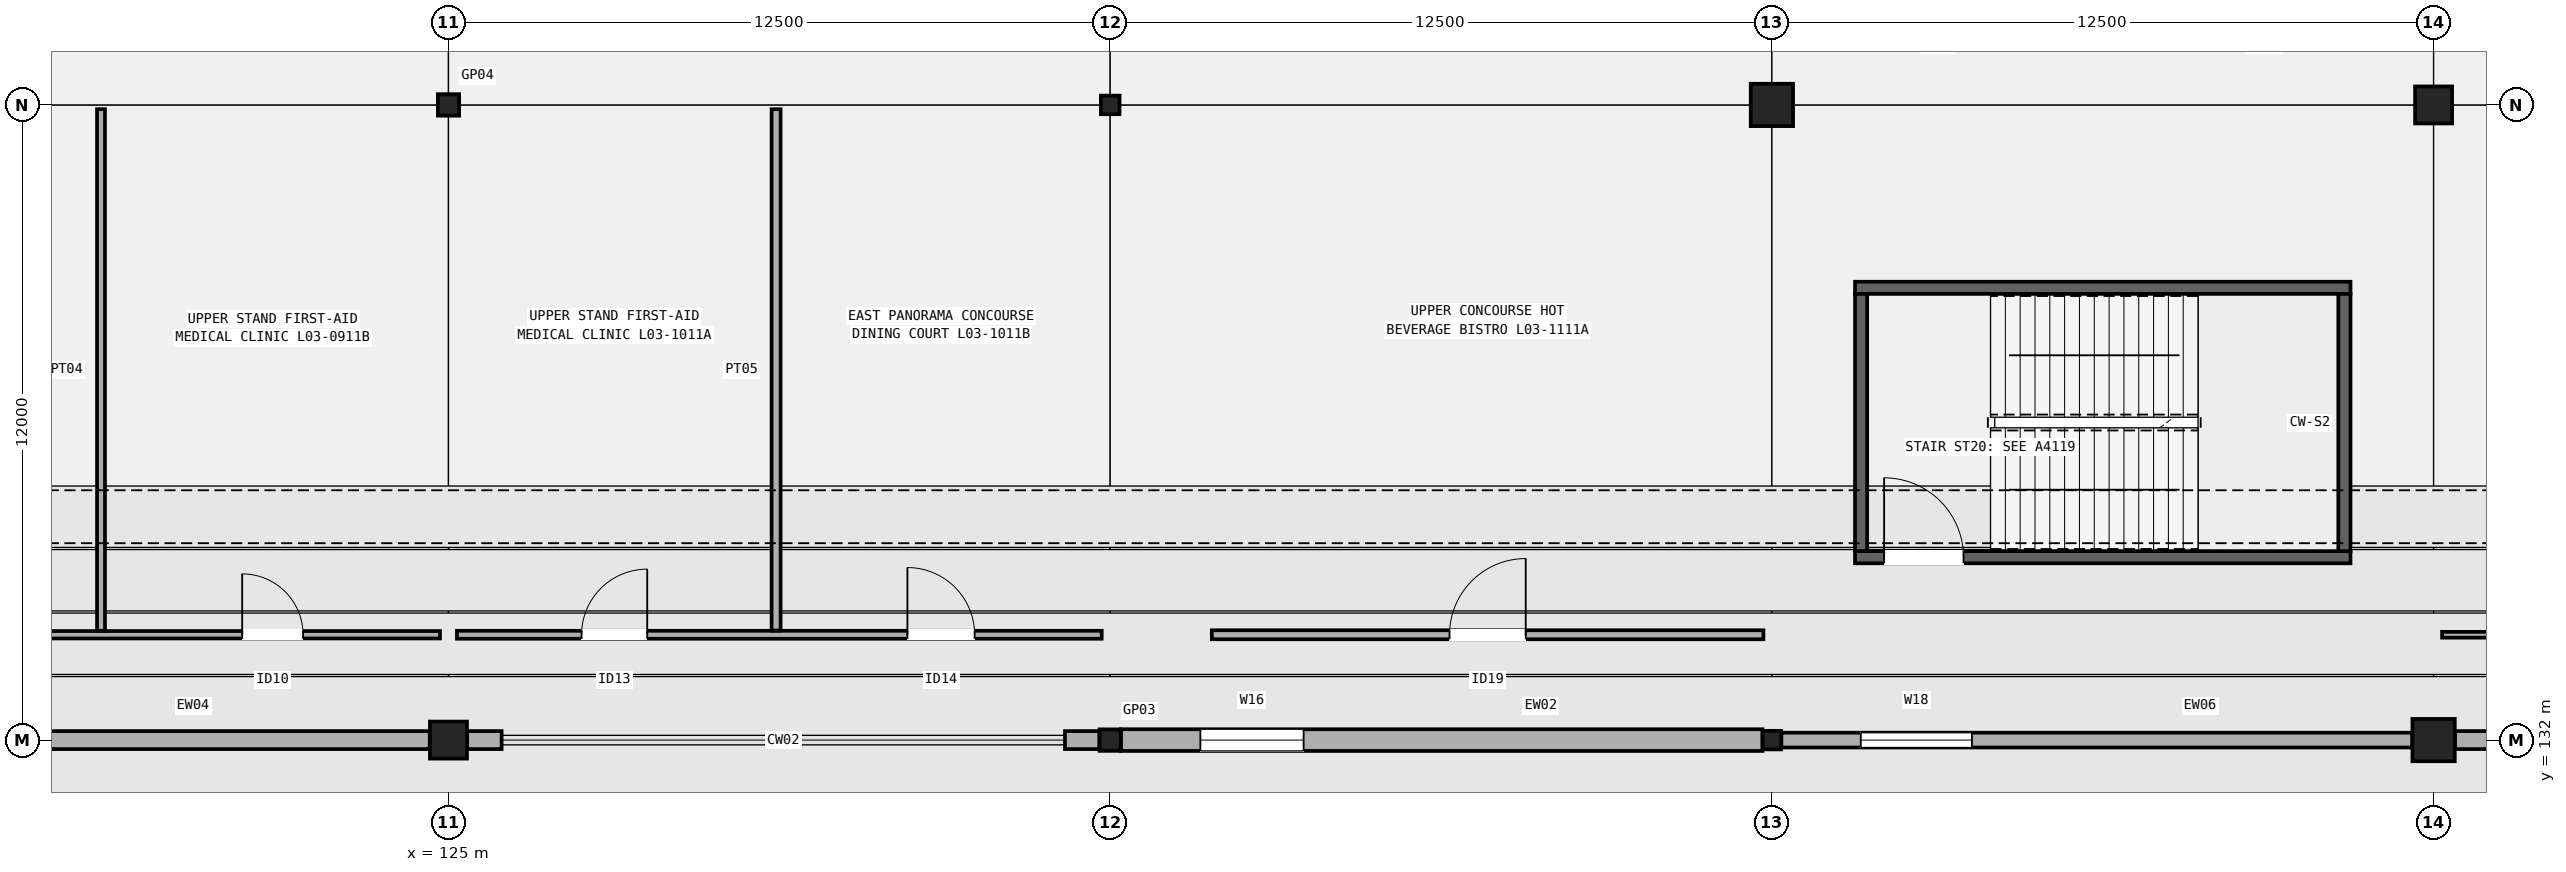
"""IFC4 building model, lengths in metres.
Left out: names, types, materials, properties, quantities, classifications, styles, units other than length and angle.
Written with IfcOpenShell. Run it as: python <this file> out.ifc"""

import sys

from ifc_helpers import new_model, si_unit, direction, frame, frame_2d, origin, origin_2d, place, context, subcontext, project, spatial, rectangle, hollow_rectangle, extrude, element, fill, save


model = new_model("IFC4")
c1 = context("Model", 3, precision=1e-05, world=origin(), true_north=direction((0.0, 1.0)))
c2 = subcontext(c1, "Body", "Model", "MODEL_VIEW")
j1 = project(units=[si_unit("LENGTHUNIT", "METRE"), si_unit("PLANEANGLEUNIT", "RADIAN")], contexts=[c1])
p1 = place(None, origin())
s1 = spatial("IfcSite", under=j1, at=p1, CompositionType="ELEMENT")
p2 = place(p1, origin())
s2 = spatial("IfcBuilding", under=s1, at=p2, CompositionType="ELEMENT")
p3 = place(p2, frame((0.0, 0.0, 15.3)))
s3 = spatial("IfcBuildingStorey", under=s2, at=p3, CompositionType="ELEMENT", Elevation=15.3)
p4 = place(p3, frame((125.0, 132.0, 0.0), z_axis=(0.0, 0.0, 1.0), x_axis=(1.0, 0.0, 0.0)))
e1 = element("IfcColumn", 1, at=p4, inside=s3, PredefinedType="COLUMN", context=c2, shape_type="SweptSolid", body=[
    extrude(rectangle(XDim=0.7, YDim=0.7, at=origin_2d()), origin(), (0.0, 0.0, 1.0), 5.1),
])
for number, where, z_axis, x_axis in (
    (2, (125.0, 144.0, 0.0), (0.0, 0.0, 1.0), (1.0, 0.0, 0.0)),
    (3, (137.5, 132.0, 0.0), (0.0, 0.0, 1.0), (1.0, 0.0, 0.0)),
):
    element("IfcColumn", number, at=place(p3, frame(where, z_axis=z_axis, x_axis=x_axis)), inside=s3, PredefinedType="COLUMN", context=c2, shape_type="SweptSolid", body=[
        extrude(hollow_rectangle(XDim=0.4, YDim=0.4, WallThickness=0.016, InnerFilletRadius=0.016, OuterFilletRadius=0.032, at=origin_2d()), origin(), (0.0, 0.0, 1.0), 5.1),
    ])
for number, where, z_axis, x_axis in (
    (4, (137.5, 144.0, 0.0), (0.0, 0.0, 1.0), (1.0, 0.0, 0.0)),
    (5, (150.0, 132.0, 0.0), (0.0, 0.0, 1.0), (1.0, 0.0, 0.0)),
):
    element("IfcColumn", number, at=place(p3, frame(where, z_axis=z_axis, x_axis=x_axis)), inside=s3, PredefinedType="COLUMN", context=c2, shape_type="SweptSolid", body=[
        extrude(hollow_rectangle(XDim=0.35, YDim=0.35, WallThickness=0.016, InnerFilletRadius=0.016, OuterFilletRadius=0.032, at=origin_2d()), origin(), (0.0, 0.0, 1.0), 5.1),
    ])
for number, where, z_axis, x_axis in (
    (6, (150.0, 144.0, 0.0), (0.0, 0.0, 1.0), (1.0, 0.0, 0.0)),
    (7, (162.5, 132.0, 0.0), (0.0, 0.0, 1.0), (1.0, 0.0, 0.0)),
):
    element("IfcColumn", number, at=place(p3, frame(where, z_axis=z_axis, x_axis=x_axis)), inside=s3, PredefinedType="COLUMN", context=c2, shape_type="SweptSolid", body=[
        extrude(rectangle(XDim=0.8, YDim=0.8, at=origin_2d()), origin(), (0.0, 0.0, 1.0), 5.1),
    ])
p5 = place(p3, frame((162.5, 144.0, 0.0), z_axis=(0.0, 0.0, 1.0), x_axis=(1.0, 0.0, 0.0)))
e8 = element("IfcColumn", 8, at=p5, inside=s3, PredefinedType="COLUMN", context=c2, shape_type="SweptSolid", body=[
    extrude(rectangle(XDim=0.7, YDim=0.7, at=origin_2d()), origin(), (0.0, 0.0, 1.0), 5.1),
])
p6 = place(p3, frame((112.404, 132.0, 0.0), z_axis=(0.0, 0.0, 1.0), x_axis=(1.0, 0.0, 0.0)))
e9 = element("IfcWall", 9, at=p6, inside=s3, PredefinedType="SOLIDWALL", context=c2, shape_type="SweptSolid", body=[
    extrude(rectangle(XDim=12.242, YDim=0.34, at=frame_2d((6.121, 0.0))), origin(), (0.0, 0.0, 1.0), 4.172),
])
p7 = place(p6, frame((1.5, 0.0, 0.95)))
e10 = element("IfcOpeningElement", 10, at=p7, cuts=e9, PredefinedType="OPENING", context=c2, shape_type="SweptSolid", body=[
    extrude(rectangle(XDim=1.5, YDim=2.25, at=frame_2d((0.75, 1.125))), frame((0.0, 0.18, 0.0), z_axis=(0.0, -1.0, 0.0), x_axis=(1.0, 0.0, 0.0)), (0.0, 0.0, 1.0), 0.36),
])
for number, where, z_axis, x_axis in (
    (11, (125.354, 132.0, 0.0), (0.0, 0.0, 1.0), (1.0, 0.0, 0.0)),
    (12, (136.646, 132.0, 0.0), (0.0, 0.0, 1.0), (1.0, 0.0, 0.0)),
):
    element("IfcWall", number, at=place(p3, frame(where, z_axis=z_axis, x_axis=x_axis)), inside=s3, PredefinedType="SOLIDWALL", context=c2, shape_type="SweptSolid", body=[
        extrude(rectangle(XDim=0.65, YDim=0.34, at=frame_2d((0.325, 0.0))), origin(), (0.0, 0.0, 1.0), 4.06),
    ])
p8 = place(p3, frame((137.704, 132.0, 0.0), z_axis=(0.0, 0.0, 1.0), x_axis=(1.0, 0.0, 0.0)))
e13 = element("IfcWall", 13, at=p8, inside=s3, PredefinedType="SOLIDWALL", context=c2, shape_type="SweptSolid", body=[
    extrude(rectangle(XDim=12.117, YDim=0.41, at=frame_2d((6.059, 0.0))), origin(), (0.0, 0.0, 1.0), 4.16),
])
p9 = place(p8, frame((1.5, 0.0, 0.95)))
e14 = element("IfcOpeningElement", 14, at=p9, cuts=e13, PredefinedType="OPENING", context=c2, shape_type="SweptSolid", body=[
    extrude(rectangle(XDim=1.95, YDim=1.9, at=frame_2d((0.975, 0.95))), frame((0.0, 0.215, 0.0), z_axis=(0.0, -1.0, 0.0), x_axis=(1.0, 0.0, 0.0)), (0.0, 0.0, 1.0), 0.43),
])
p10 = place(p3, frame((150.179, 132.0, 0.0), z_axis=(0.0, 0.0, 1.0), x_axis=(1.0, 0.0, 0.0)))
e15 = element("IfcWall", 15, at=p10, inside=s3, PredefinedType="SOLIDWALL", context=c2, shape_type="SweptSolid", body=[
    extrude(rectangle(XDim=11.917, YDim=0.28, at=frame_2d((5.958, 0.0))), origin(), (0.0, 0.0, 1.0), 4.172),
])
p11 = place(p10, frame((1.5, 0.0, 0.95)))
e16 = element("IfcOpeningElement", 16, at=p11, cuts=e15, PredefinedType="OPENING", context=c2, shape_type="SweptSolid", body=[
    extrude(rectangle(XDim=2.1, YDim=1.85, at=frame_2d((1.05, 0.925))), frame((0.0, 0.15, 0.0), z_axis=(0.0, -1.0, 0.0), x_axis=(1.0, 0.0, 0.0)), (0.0, 0.0, 1.0), 0.3),
])
p12 = place(p3, frame((162.904, 132.0, 0.0), z_axis=(0.0, 0.0, 1.0), x_axis=(1.0, 0.0, 0.0)))
e17 = element("IfcWall", 17, at=p12, inside=s3, PredefinedType="SOLIDWALL", context=c2, shape_type="SweptSolid", body=[
    extrude(rectangle(XDim=11.742, YDim=0.34, at=frame_2d((5.871, 0.0))), origin(), (0.0, 0.0, 1.0), 4.06),
])
p13 = place(p12, frame((1.5, 0.0, 0.95)))
e18 = element("IfcOpeningElement", 18, at=p13, cuts=e17, PredefinedType="OPENING", context=c2, shape_type="SweptSolid", body=[
    extrude(rectangle(XDim=2.1, YDim=2.6, at=frame_2d((1.05, 1.3))), frame((0.0, 0.18, 0.0), z_axis=(0.0, -1.0, 0.0), x_axis=(1.0, 0.0, 0.0)), (0.0, 0.0, 1.0), 0.36),
])
p14 = place(p3, frame((151.57, 135.455, 0.0), z_axis=(0.0, 0.0, 1.0), x_axis=(1.0, 0.0, 0.0)))
e19 = element("IfcWall", 19, at=p14, inside=s3, PredefinedType="SHEAR", context=c2, shape_type="SweptSolid", body=[
    extrude(rectangle(XDim=9.36, YDim=0.23, at=frame_2d((4.68, 0.0))), origin(), (0.0, 0.0, 1.0), 4.86),
])
p15 = place(p14, frame((0.55, 0.0, 0.0)))
e20 = element("IfcOpeningElement", 20, at=p15, cuts=e19, PredefinedType="OPENING", context=c2, shape_type="SweptSolid", body=[
    extrude(rectangle(XDim=1.5, YDim=2.2, at=frame_2d((0.75, 1.1))), frame((0.0, 0.125, 0.0), z_axis=(0.0, -1.0, 0.0), x_axis=(1.0, 0.0, 0.0)), (0.0, 0.0, 1.0), 0.25),
])
p16 = place(p3, frame((151.57, 140.545, 0.0), z_axis=(0.0, 0.0, 1.0), x_axis=(1.0, 0.0, 0.0)))
e21 = element("IfcWall", 21, at=p16, inside=s3, PredefinedType="SHEAR", context=c2, shape_type="SweptSolid", body=[
    extrude(rectangle(XDim=9.36, YDim=0.23, at=frame_2d((4.68, 0.0))), origin(), (0.0, 0.0, 1.0), 4.86),
])
for number, where, z_axis, x_axis in (
    (22, (151.685, 135.57, 0.0), (0.0, 0.0, 1.0), (0.0, 1.0, 0.0)),
    (23, (160.815, 135.57, 0.0), (0.0, 0.0, 1.0), (0.0, 1.0, 0.0)),
):
    element("IfcWall", number, at=place(p3, frame(where, z_axis=z_axis, x_axis=x_axis)), inside=s3, PredefinedType="SHEAR", context=c2, shape_type="SweptSolid", body=[
        extrude(rectangle(XDim=4.86, YDim=0.23, at=frame_2d((2.43, 0.0))), origin(), (0.0, 0.0, 1.0), 4.86),
    ])
p17 = place(p3, frame((112.16, 133.99, 0.0), z_axis=(0.0, 0.0, 1.0), x_axis=(1.0, 0.0, 0.0)))
e24 = element("IfcWall", 24, at=p17, inside=s3, PredefinedType="PARTITIONING", context=c2, shape_type="SweptSolid", body=[
    extrude(rectangle(XDim=12.68, YDim=0.14, at=frame_2d((6.34, 0.0))), origin(), (0.0, 0.0, 1.0), 2.77),
])
p18 = place(p17, frame((2.538, 0.0, 0.0)))
e25 = element("IfcOpeningElement", 25, at=p18, cuts=e24, PredefinedType="OPENING", context=c2, shape_type="SweptSolid", body=[
    extrude(rectangle(XDim=1.12, YDim=2.18, at=frame_2d((0.56, 1.09))), frame((0.0, 0.08, 0.0), z_axis=(0.0, -1.0, 0.0), x_axis=(1.0, 0.0, 0.0)), (0.0, 0.0, 1.0), 0.16),
])
p19 = place(p17, frame((8.943, 0.0, 0.0)))
e26 = element("IfcOpeningElement", 26, at=p19, cuts=e24, PredefinedType="OPENING", context=c2, shape_type="SweptSolid", body=[
    extrude(rectangle(XDim=1.15, YDim=2.15, at=frame_2d((0.575, 1.075))), frame((0.0, 0.08, 0.0), z_axis=(0.0, -1.0, 0.0), x_axis=(1.0, 0.0, 0.0)), (0.0, 0.0, 1.0), 0.16),
])
p20 = place(p3, frame((118.437, 134.065, 0.0), z_axis=(0.0, 0.0, 1.0), x_axis=(0.0, 1.0, 0.0)))
e27 = element("IfcWall", 27, at=p20, inside=s3, PredefinedType="PARTITIONING", context=c2, shape_type="SweptSolid", body=[
    extrude(rectangle(XDim=9.855, YDim=0.15, at=frame_2d((4.927, 0.0))), origin(), (0.0, 0.0, 1.0), 2.77),
])
p21 = place(p3, frame((125.16, 133.99, 0.0), z_axis=(0.0, 0.0, 1.0), x_axis=(1.0, 0.0, 0.0)))
e28 = element("IfcWall", 28, at=p21, inside=s3, PredefinedType="PARTITIONING", context=c2, shape_type="SweptSolid", body=[
    extrude(rectangle(XDim=12.18, YDim=0.15, at=frame_2d((6.09, 0.0))), origin(), (0.0, 0.0, 1.0), 2.77),
])
p22 = place(p21, frame((2.354, 0.0, 0.0)))
e29 = element("IfcOpeningElement", 29, at=p22, cuts=e28, PredefinedType="OPENING", context=c2, shape_type="SweptSolid", body=[
    extrude(rectangle(XDim=1.24, YDim=2.22, at=frame_2d((0.62, 1.11))), frame((0.0, 0.085, 0.0), z_axis=(0.0, -1.0, 0.0), x_axis=(1.0, 0.0, 0.0)), (0.0, 0.0, 1.0), 0.17),
])
p23 = place(p21, frame((8.51, 0.0, 0.0)))
e30 = element("IfcOpeningElement", 30, at=p23, cuts=e28, PredefinedType="OPENING", context=c2, shape_type="SweptSolid", body=[
    extrude(rectangle(XDim=1.27, YDim=2.2, at=frame_2d((0.635, 1.1))), frame((0.0, 0.085, 0.0), z_axis=(0.0, -1.0, 0.0), x_axis=(1.0, 0.0, 0.0)), (0.0, 0.0, 1.0), 0.17),
])
p24 = place(p3, frame((131.189, 134.07, 0.0), z_axis=(0.0, 0.0, 1.0), x_axis=(0.0, 1.0, 0.0)))
e31 = element("IfcWall", 31, at=p24, inside=s3, PredefinedType="PARTITIONING", context=c2, shape_type="SweptSolid", body=[
    extrude(rectangle(XDim=9.85, YDim=0.17, at=frame_2d((4.925, 0.0))), origin(), (0.0, 0.0, 1.0), 2.77),
])
p25 = place(p3, frame((139.42, 133.99, 0.0), z_axis=(0.0, 0.0, 1.0), x_axis=(1.0, 0.0, 0.0)))
e32 = element("IfcWall", 32, at=p25, inside=s3, PredefinedType="PARTITIONING", context=c2, shape_type="SweptSolid", body=[
    extrude(rectangle(XDim=10.42, YDim=0.17, at=frame_2d((5.21, 0.0))), origin(), (0.0, 0.0, 1.0), 2.77),
])
p26 = place(p25, frame((4.49, 0.0, 0.0)))
e33 = element("IfcOpeningElement", 33, at=p26, cuts=e32, PredefinedType="OPENING", context=c2, shape_type="SweptSolid", body=[
    extrude(rectangle(XDim=1.44, YDim=2.26, at=frame_2d((0.72, 1.13))), frame((0.0, 0.095, 0.0), z_axis=(0.0, -1.0, 0.0), x_axis=(1.0, 0.0, 0.0)), (0.0, 0.0, 1.0), 0.19),
])
p27 = place(p3, frame((162.66, 133.99, 0.0), z_axis=(0.0, 0.0, 1.0), x_axis=(1.0, 0.0, 0.0)))
e34 = element("IfcWall", 34, at=p27, inside=s3, PredefinedType="PARTITIONING", context=c2, shape_type="SweptSolid", body=[
    extrude(rectangle(XDim=12.18, YDim=0.11, at=frame_2d((6.09, 0.0))), origin(), (0.0, 0.0, 1.0), 2.77),
])
p28 = place(p27, frame((2.524, 0.0, 0.0)))
e35 = element("IfcOpeningElement", 35, at=p28, cuts=e34, PredefinedType="OPENING", context=c2, shape_type="SweptSolid", body=[
    extrude(rectangle(XDim=0.9, YDim=2.06, at=frame_2d((0.45, 1.03))), frame((0.0, 0.065, 0.0), z_axis=(0.0, -1.0, 0.0), x_axis=(1.0, 0.0, 0.0)), (0.0, 0.0, 1.0), 0.13),
])
p29 = place(p27, frame((8.685, 0.0, 0.0)))
e36 = element("IfcOpeningElement", 36, at=p29, cuts=e34, PredefinedType="OPENING", context=c2, shape_type="SweptSolid", body=[
    extrude(rectangle(XDim=0.92, YDim=2.1, at=frame_2d((0.46, 1.05))), frame((0.0, 0.065, 0.0), z_axis=(0.0, -1.0, 0.0), x_axis=(1.0, 0.0, 0.0)), (0.0, 0.0, 1.0), 0.13),
])
p30 = place(p9, origin())
e37 = element("IfcWindow", 37, at=p30, inside=s3, PartitioningType="SINGLE_PANEL", PredefinedType="WINDOW", context=c2, shape_type="SweptSolid", body=[
    extrude(rectangle(XDim=1.95, YDim=1.9, at=frame_2d((0.975, 0.95))), frame((0.0, 0.03, 0.0), z_axis=(0.0, -1.0, 0.0), x_axis=(1.0, 0.0, 0.0)), (0.0, 0.0, 1.0), 0.06),
])
fill(e14, e37)
p31 = place(p11, origin())
e38 = element("IfcWindow", 38, at=p31, inside=s3, PartitioningType="SINGLE_PANEL", PredefinedType="WINDOW", context=c2, shape_type="SweptSolid", body=[
    extrude(rectangle(XDim=2.1, YDim=1.85, at=frame_2d((1.05, 0.925))), frame((0.0, 0.03, 0.0), z_axis=(0.0, -1.0, 0.0), x_axis=(1.0, 0.0, 0.0)), (0.0, 0.0, 1.0), 0.06),
])
fill(e16, e38)
p32 = place(p15, origin())
e39 = element("IfcDoor", 39, at=p32, inside=s3, OperationType="SINGLE_SWING_LEFT", PredefinedType="DOOR", context=c2, shape_type="SweptSolid", body=[
    extrude(rectangle(XDim=1.5, YDim=2.2, at=frame_2d((0.75, 1.1))), frame((0.0, 0.025, 0.0), z_axis=(0.0, -1.0, 0.0), x_axis=(1.0, 0.0, 0.0)), (0.0, 0.0, 1.0), 0.05),
])
fill(e20, e39)
p33 = place(p19, origin())
e40 = element("IfcDoor", 40, at=p33, inside=s3, OperationType="SINGLE_SWING_LEFT", PredefinedType="DOOR", context=c2, shape_type="SweptSolid", body=[
    extrude(rectangle(XDim=1.15, YDim=2.15, at=frame_2d((0.575, 1.075))), frame((0.0, 0.025, 0.0), z_axis=(0.0, -1.0, 0.0), x_axis=(1.0, 0.0, 0.0)), (0.0, 0.0, 1.0), 0.05),
])
fill(e26, e40)
p34 = place(p22, origin())
e41 = element("IfcDoor", 41, at=p34, inside=s3, OperationType="SINGLE_SWING_RIGHT", PredefinedType="DOOR", context=c2, shape_type="SweptSolid", body=[
    extrude(rectangle(XDim=1.24, YDim=2.22, at=frame_2d((0.62, 1.11))), frame((0.0, 0.025, 0.0), z_axis=(0.0, -1.0, 0.0), x_axis=(1.0, 0.0, 0.0)), (0.0, 0.0, 1.0), 0.05),
])
fill(e29, e41)
p35 = place(p23, origin())
e42 = element("IfcDoor", 42, at=p35, inside=s3, OperationType="SINGLE_SWING_LEFT", PredefinedType="DOOR", context=c2, shape_type="SweptSolid", body=[
    extrude(rectangle(XDim=1.27, YDim=2.2, at=frame_2d((0.635, 1.1))), frame((0.0, 0.025, 0.0), z_axis=(0.0, -1.0, 0.0), x_axis=(1.0, 0.0, 0.0)), (0.0, 0.0, 1.0), 0.05),
])
fill(e30, e42)
p36 = place(p26, origin())
e43 = element("IfcDoor", 43, at=p36, inside=s3, OperationType="SINGLE_SWING_RIGHT", PredefinedType="DOOR", context=c2, shape_type="SweptSolid", body=[
    extrude(rectangle(XDim=1.44, YDim=2.26, at=frame_2d((0.72, 1.13))), frame((0.0, 0.025, 0.0), z_axis=(0.0, -1.0, 0.0), x_axis=(1.0, 0.0, 0.0)), (0.0, 0.0, 1.0), 0.05),
])
fill(e33, e43)
save(model, sys.argv[1])
